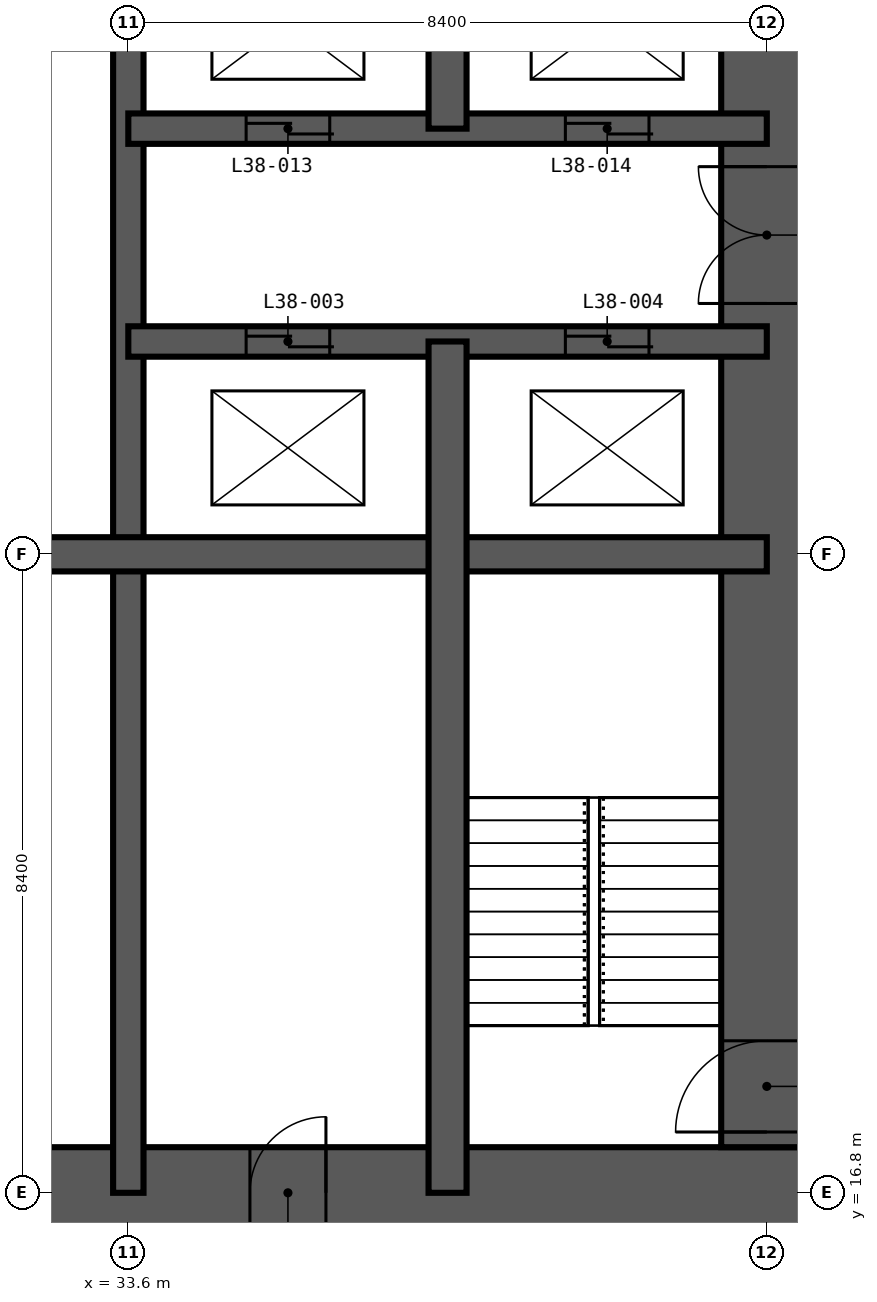
"""IFC4 building model, lengths in metres.
Left out: names, types, materials, properties, quantities, classifications, styles, units other than length and angle.
Written with IfcOpenShell. Run it as: python <this file> out.ifc"""

import sys

from ifc_helpers import new_model, si_unit, direction, frame, frame_2d, origin, place, context, subcontext, project, spatial, rectangle, extrude, element, fill, save


model = new_model("IFC4")
c1 = context("Model", 3, precision=1e-05, world=origin(), true_north=direction((0.0, 1.0)))
c2 = subcontext(c1, "Body", "Model", "MODEL_VIEW")
j1 = project(units=[si_unit("LENGTHUNIT", "METRE"), si_unit("PLANEANGLEUNIT", "RADIAN")], contexts=[c1])
p1 = place(None, origin())
s1 = spatial("IfcSite", under=j1, at=p1, CompositionType="ELEMENT")
p2 = place(p1, origin())
s2 = spatial("IfcBuilding", under=s1, at=p2, CompositionType="ELEMENT")
p3 = place(p2, frame((0.0, 0.0, 147.6)))
s3 = spatial("IfcBuildingStorey", under=s2, at=p3, CompositionType="ELEMENT", Elevation=147.6)
p4 = place(p3, frame((16.2, 16.8, -0.35), z_axis=(0.0, 0.0, 1.0), x_axis=(1.0, 0.0, 0.0)))
e1 = element("IfcWall", 1, at=p4, inside=s3, PredefinedType="SHEAR", context=c2, shape_type="SweptSolid", body=[
    extrude(rectangle(XDim=26.4, YDim=1.2, at=frame_2d((13.2, 0.0))), origin(), (0.0, 0.0, 1.0), 5.95),
])
p5 = place(p4, frame((12.7, 0.0, 0.35)))
e2 = element("IfcOpeningElement", 2, at=p5, cuts=e1, PredefinedType="OPENING", context=c2, shape_type="SweptSolid", body=[
    extrude(rectangle(XDim=1.0, YDim=2.1, at=frame_2d((0.5, 1.05))), frame((0.0, 0.61, 0.0), z_axis=(0.0, -1.0, 0.0), x_axis=(1.0, 0.0, 0.0)), (0.0, 0.0, 1.0), 1.22),
])
p6 = place(p4, frame((19.0, 0.0, 0.35)))
e3 = element("IfcOpeningElement", 3, at=p6, cuts=e1, PredefinedType="OPENING", context=c2, shape_type="SweptSolid", body=[
    extrude(rectangle(XDim=1.0, YDim=2.1, at=frame_2d((0.5, 1.05))), frame((0.0, 0.61, 0.0), z_axis=(0.0, -1.0, 0.0), x_axis=(1.0, 0.0, 0.0)), (0.0, 0.0, 1.0), 1.22),
])
p7 = place(p3, frame((42.0, 17.4, -0.35), z_axis=(0.0, 0.0, 1.0), x_axis=(0.0, 1.0, 0.0)))
e4 = element("IfcWall", 4, at=p7, inside=s3, PredefinedType="SHEAR", context=c2, shape_type="SweptSolid", body=[
    extrude(rectangle(XDim=24.0, YDim=1.2, at=frame_2d((12.0, 0.0))), origin(), (0.0, 0.0, 1.0), 5.95),
])
p8 = place(p7, frame((0.2, 0.0, 0.35)))
e5 = element("IfcOpeningElement", 5, at=p8, cuts=e4, PredefinedType="OPENING", context=c2, shape_type="SweptSolid", body=[
    extrude(rectangle(XDim=1.2, YDim=2.2, at=frame_2d((0.6, 1.1))), frame((0.0, 0.61, 0.0), z_axis=(0.0, -1.0, 0.0), x_axis=(1.0, 0.0, 0.0)), (0.0, 0.0, 1.0), 1.22),
])
p9 = place(p7, frame((11.1, 0.0, 0.35)))
e6 = element("IfcOpeningElement", 6, at=p9, cuts=e4, PredefinedType="OPENING", context=c2, shape_type="SweptSolid", body=[
    extrude(rectangle(XDim=1.8, YDim=2.2, at=frame_2d((0.9, 1.1))), frame((0.0, 0.61, 0.0), z_axis=(0.0, -1.0, 0.0), x_axis=(1.0, 0.0, 0.0)), (0.0, 0.0, 1.0), 1.22),
])
p10 = place(p3, frame((33.6, 16.8, -0.35), z_axis=(0.0, 0.0, 1.0), x_axis=(0.0, 1.0, 0.0)))
e7 = element("IfcWall", 7, at=p10, inside=s3, PredefinedType="SHEAR", context=c2, shape_type="SweptSolid", body=[
    extrude(rectangle(XDim=25.2, YDim=0.4, at=frame_2d((12.6, 0.0))), origin(), (0.0, 0.0, 1.0), 5.95),
])
p11 = place(p10, frame((22.5, 0.0, 0.35)))
e8 = element("IfcOpeningElement", 8, at=p11, cuts=e7, PredefinedType="OPENING", context=c2, shape_type="SweptSolid", body=[
    extrude(rectangle(XDim=1.2, YDim=2.2, at=frame_2d((0.6, 1.1))), frame((0.0, 0.21, 0.0), z_axis=(0.0, -1.0, 0.0), x_axis=(1.0, 0.0, 0.0)), (0.0, 0.0, 1.0), 0.42),
])
p12 = place(p10, frame((18.3, 0.0, 0.35)))
e9 = element("IfcOpeningElement", 9, at=p12, cuts=e7, PredefinedType="OPENING", context=c2, shape_type="SweptSolid", body=[
    extrude(rectangle(XDim=1.2, YDim=2.2, at=frame_2d((0.6, 1.1))), frame((0.0, 0.21, 0.0), z_axis=(0.0, -1.0, 0.0), x_axis=(1.0, 0.0, 0.0)), (0.0, 0.0, 1.0), 0.42),
])
p13 = place(p3, frame((33.6, 28.0, -0.35), z_axis=(0.0, 0.0, 1.0), x_axis=(1.0, 0.0, 0.0)))
e10 = element("IfcWall", 10, at=p13, inside=s3, PredefinedType="SHEAR", context=c2, shape_type="SweptSolid", body=[
    extrude(rectangle(XDim=8.4, YDim=0.4, at=frame_2d((4.2, 0.0))), origin(), (0.0, 0.0, 1.0), 5.95),
])
p14 = place(p13, frame((1.55, 0.0, 0.35)))
e11 = element("IfcOpeningElement", 11, at=p14, cuts=e10, PredefinedType="OPENING", context=c2, shape_type="SweptSolid", body=[
    extrude(rectangle(XDim=1.1, YDim=2.2, at=frame_2d((0.55, 1.1))), frame((0.0, 0.21, 0.0), z_axis=(0.0, -1.0, 0.0), x_axis=(1.0, 0.0, 0.0)), (0.0, 0.0, 1.0), 0.42),
])
p15 = place(p13, frame((5.75, 0.0, 0.35)))
e12 = element("IfcOpeningElement", 12, at=p15, cuts=e10, PredefinedType="OPENING", context=c2, shape_type="SweptSolid", body=[
    extrude(rectangle(XDim=1.1, YDim=2.2, at=frame_2d((0.55, 1.1))), frame((0.0, 0.21, 0.0), z_axis=(0.0, -1.0, 0.0), x_axis=(1.0, 0.0, 0.0)), (0.0, 0.0, 1.0), 0.42),
])
p16 = place(p3, frame((33.6, 30.8, -0.35), z_axis=(0.0, 0.0, 1.0), x_axis=(1.0, 0.0, 0.0)))
e13 = element("IfcWall", 13, at=p16, inside=s3, PredefinedType="SHEAR", context=c2, shape_type="SweptSolid", body=[
    extrude(rectangle(XDim=8.4, YDim=0.4, at=frame_2d((4.2, 0.0))), origin(), (0.0, 0.0, 1.0), 5.95),
])
p17 = place(p16, frame((1.55, 0.0, 0.35)))
e14 = element("IfcOpeningElement", 14, at=p17, cuts=e13, PredefinedType="OPENING", context=c2, shape_type="SweptSolid", body=[
    extrude(rectangle(XDim=1.1, YDim=2.2, at=frame_2d((0.55, 1.1))), frame((0.0, 0.21, 0.0), z_axis=(0.0, -1.0, 0.0), x_axis=(1.0, 0.0, 0.0)), (0.0, 0.0, 1.0), 0.42),
])
p18 = place(p16, frame((5.75, 0.0, 0.35)))
e15 = element("IfcOpeningElement", 15, at=p18, cuts=e13, PredefinedType="OPENING", context=c2, shape_type="SweptSolid", body=[
    extrude(rectangle(XDim=1.1, YDim=2.2, at=frame_2d((0.55, 1.1))), frame((0.0, 0.21, 0.0), z_axis=(0.0, -1.0, 0.0), x_axis=(1.0, 0.0, 0.0)), (0.0, 0.0, 1.0), 0.42),
])
p19 = place(p3, frame((16.8, 25.2, -0.35), z_axis=(0.0, 0.0, 1.0), x_axis=(1.0, 0.0, 0.0)))
e16 = element("IfcWall", 16, at=p19, inside=s3, PredefinedType="SHEAR", context=c2, shape_type="SweptSolid", body=[
    extrude(rectangle(XDim=25.2, YDim=0.45, at=frame_2d((12.6, 0.0))), origin(), (0.0, 0.0, 1.0), 5.95),
])
p20 = place(p3, frame((37.8, 16.8, -0.35), z_axis=(0.0, 0.0, 1.0), x_axis=(0.0, 1.0, 0.0)))
e17 = element("IfcWall", 17, at=p20, inside=s3, PredefinedType="SHEAR", context=c2, shape_type="SweptSolid", body=[
    extrude(rectangle(XDim=11.2, YDim=0.5, at=frame_2d((5.6, 0.0))), origin(), (0.0, 0.0, 1.0), 5.95),
])
p21 = place(p3, frame((37.8, 30.8, -0.35), z_axis=(0.0, 0.0, 1.0), x_axis=(0.0, 1.0, 0.0)))
e18 = element("IfcWall", 18, at=p21, inside=s3, PredefinedType="SHEAR", context=c2, shape_type="SweptSolid", body=[
    extrude(rectangle(XDim=2.8, YDim=0.5, at=frame_2d((1.4, 0.0))), origin(), (0.0, 0.0, 1.0), 5.95),
])
p22 = place(p8, origin())
e19 = element("IfcDoor", 19, at=p22, inside=s3, OperationType="SINGLE_SWING_LEFT", PredefinedType="DOOR", context=c2, shape_type="SweptSolid", body=[
    extrude(rectangle(XDim=1.2, YDim=2.2, at=frame_2d((0.6, 1.1))), frame((0.0, 0.025, 0.0), z_axis=(0.0, -1.0, 0.0), x_axis=(1.0, 0.0, 0.0)), (0.0, 0.0, 1.0), 0.05),
])
fill(e5, e19)
p23 = place(p14, origin())
e20 = element("IfcDoor", 20, at=p23, inside=s3, OperationType="DOUBLE_DOOR_SLIDING", PredefinedType="DOOR", context=c2, shape_type="SweptSolid", body=[
    extrude(rectangle(XDim=1.1, YDim=2.2, at=frame_2d((0.55, 1.1))), frame((0.0, 0.025, 0.0), z_axis=(0.0, -1.0, 0.0), x_axis=(1.0, 0.0, 0.0)), (0.0, 0.0, 1.0), 0.05),
])
fill(e11, e20)
p24 = place(p15, origin())
e21 = element("IfcDoor", 21, at=p24, inside=s3, OperationType="DOUBLE_DOOR_SLIDING", PredefinedType="DOOR", context=c2, shape_type="SweptSolid", body=[
    extrude(rectangle(XDim=1.1, YDim=2.2, at=frame_2d((0.55, 1.1))), frame((0.0, 0.025, 0.0), z_axis=(0.0, -1.0, 0.0), x_axis=(1.0, 0.0, 0.0)), (0.0, 0.0, 1.0), 0.05),
])
fill(e12, e21)
p25 = place(p17, origin())
e22 = element("IfcDoor", 22, at=p25, inside=s3, OperationType="DOUBLE_DOOR_SLIDING", PredefinedType="DOOR", context=c2, shape_type="SweptSolid", body=[
    extrude(rectangle(XDim=1.1, YDim=2.2, at=frame_2d((0.55, 1.1))), frame((0.0, 0.025, 0.0), z_axis=(0.0, -1.0, 0.0), x_axis=(1.0, 0.0, 0.0)), (0.0, 0.0, 1.0), 0.05),
])
fill(e14, e22)
p26 = place(p18, origin())
e23 = element("IfcDoor", 23, at=p26, inside=s3, OperationType="DOUBLE_DOOR_SLIDING", PredefinedType="DOOR", context=c2, shape_type="SweptSolid", body=[
    extrude(rectangle(XDim=1.1, YDim=2.2, at=frame_2d((0.55, 1.1))), frame((0.0, 0.025, 0.0), z_axis=(0.0, -1.0, 0.0), x_axis=(1.0, 0.0, 0.0)), (0.0, 0.0, 1.0), 0.05),
])
fill(e15, e23)
p27 = place(p9, origin())
e24 = element("IfcDoor", 24, at=p27, inside=s3, OperationType="DOUBLE_DOOR_DOUBLE_SWING", PredefinedType="DOOR", context=c2, shape_type="SweptSolid", body=[
    extrude(rectangle(XDim=1.8, YDim=2.2, at=frame_2d((0.9, 1.1))), frame((0.0, 0.025, 0.0), z_axis=(0.0, -1.0, 0.0), x_axis=(1.0, 0.0, 0.0)), (0.0, 0.0, 1.0), 0.05),
])
fill(e6, e24)
p28 = place(p6, origin())
e25 = element("IfcDoor", 25, at=p28, inside=s3, OperationType="SINGLE_SWING_RIGHT", PredefinedType="DOOR", context=c2, shape_type="SweptSolid", body=[
    extrude(rectangle(XDim=1.0, YDim=2.1, at=frame_2d((0.5, 1.05))), frame((0.0, 0.025, 0.0), z_axis=(0.0, -1.0, 0.0), x_axis=(1.0, 0.0, 0.0)), (0.0, 0.0, 1.0), 0.05),
])
fill(e3, e25)
save(model, sys.argv[1])
